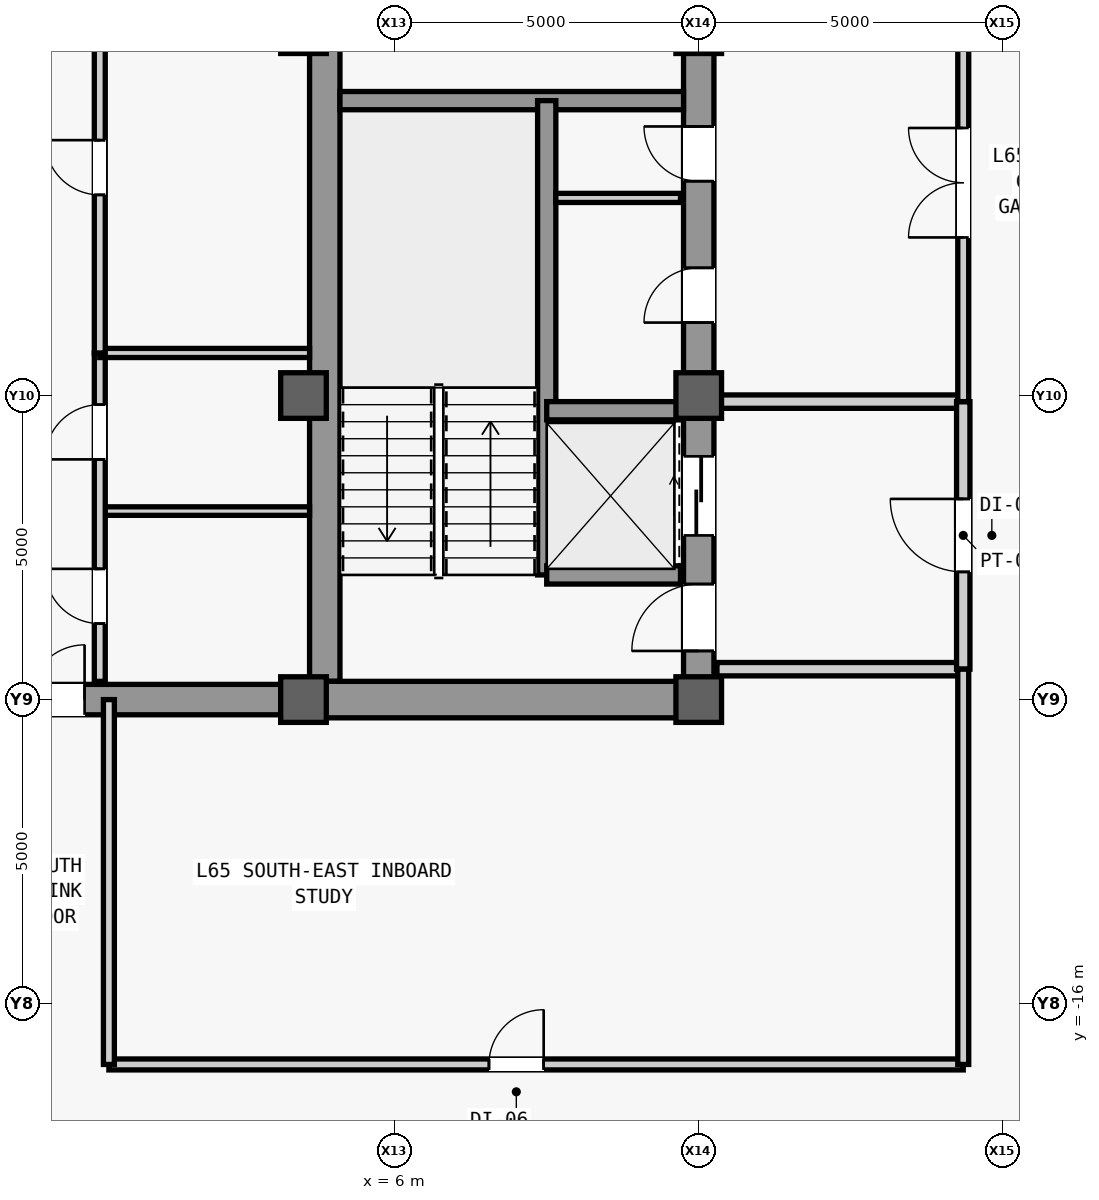
"""IFC4 building model, lengths in metres.
Left out: names, types, materials, properties, quantities, classifications, styles, units other than length and angle.
Written with IfcOpenShell. Run it as: python <this file> out.ifc"""

import sys

from ifc_helpers import new_model, si_unit, direction, frame, frame_2d, origin, origin_2d, place, context, subcontext, project, spatial, rectangle, extrude, source, transform, mapped, element, fill, save


model = new_model("IFC4")
c1 = context("Model", 3, precision=1e-05, world=origin(), true_north=direction((0.0, 1.0)))
c2 = subcontext(c1, "Body", "Model", "MODEL_VIEW")
j1 = project(units=[si_unit("LENGTHUNIT", "METRE"), si_unit("PLANEANGLEUNIT", "RADIAN")], contexts=[c1])
p1 = place(None, origin())
s1 = spatial("IfcSite", under=j1, at=p1, CompositionType="ELEMENT")
p2 = place(p1, origin())
s2 = spatial("IfcBuilding", under=s1, at=p2, CompositionType="ELEMENT")
p3 = place(p2, frame((0.0, 0.0, 277.5)))
s3 = spatial("IfcBuildingStorey", under=s2, at=p3, CompositionType="ELEMENT", Elevation=277.5)
m1 = source(origin(), c2, "Body", "SweptSolid", [
    extrude(rectangle(XDim=22.0, YDim=0.5, at=frame_2d((11.0, 0.0))), origin(), (0.0, 0.0, 1.0), 3.78),
])
p4 = place(p3, frame((11.0, -11.0, 0.0), z_axis=(0.0, 0.0, 1.0), x_axis=(0.0, 1.0, 0.0)))
e1 = element("IfcWall", 1, at=p4, inside=s3, PredefinedType="SHEAR", context=c2, shape_type="MappedRepresentation", body=[
    mapped(m1, transform((0.0, 0.0, 0.0), scale=1.0)),
])
m2 = source(origin(), c2, "Body", "SweptSolid", [
    extrude(rectangle(XDim=1.1, YDim=2.2, at=frame_2d((0.55, 1.1))), frame((0.0, 0.26, 0.0), z_axis=(0.0, -1.0, 0.0), x_axis=(1.0, 0.0, 0.0)), (0.0, 0.0, 1.0), 0.52),
])
p5 = place(p4, frame((0.8, 0.0, 0.0)))
e2 = element("IfcOpeningElement", 2, at=p5, cuts=e1, PredefinedType="OPENING", context=c2, shape_type="MappedRepresentation", body=[
    mapped(m2, transform((0.0, 0.0, 0.0), scale=1.0)),
])
m3 = source(origin(), c2, "Body", "SweptSolid", [
    extrude(rectangle(XDim=0.9, YDim=2.15, at=frame_2d((0.45, 1.075))), frame((0.0, 0.26, 0.0), z_axis=(0.0, -1.0, 0.0), x_axis=(1.0, 0.0, 0.0)), (0.0, 0.0, 1.0), 0.52),
])
p6 = place(p4, frame((6.2, 0.0, 0.0)))
e3 = element("IfcOpeningElement", 3, at=p6, cuts=e1, PredefinedType="OPENING", context=c2, shape_type="MappedRepresentation", body=[
    mapped(m3, transform((0.0, 0.0, 0.0), scale=1.0)),
])
p7 = place(p4, frame((8.525, 0.0, 0.0)))
e4 = element("IfcOpeningElement", 4, at=p7, cuts=e1, PredefinedType="OPENING", context=c2, shape_type="MappedRepresentation", body=[
    mapped(m3, transform((0.0, 0.0, 0.0), scale=1.0)),
])
m4 = source(origin(), c2, "Body", "SweptSolid", [
    extrude(rectangle(XDim=1.2, YDim=2.3, at=frame_2d((0.6, 1.15))), frame((0.0, 0.26, 0.0), z_axis=(0.0, -1.0, 0.0), x_axis=(1.0, 0.0, 0.0)), (0.0, 0.0, 1.0), 0.52),
])
p8 = place(p4, frame((17.6, 0.0, 0.0)))
e5 = element("IfcOpeningElement", 5, at=p8, cuts=e1, PredefinedType="OPENING", context=c2, shape_type="MappedRepresentation", body=[
    mapped(m4, transform((0.0, 0.0, 0.0), scale=1.0)),
])
p9 = place(p4, frame((19.6, 0.0, 0.0)))
e6 = element("IfcOpeningElement", 6, at=p9, cuts=e1, PredefinedType="OPENING", context=c2, shape_type="MappedRepresentation", body=[
    mapped(m4, transform((0.0, 0.0, 0.0), scale=1.0)),
])
m5 = source(origin(), c2, "Body", "SweptSolid", [
    extrude(rectangle(XDim=1.3, YDim=2.3, at=frame_2d((0.65, 1.15))), frame((0.0, 0.26, 0.0), z_axis=(0.0, -1.0, 0.0), x_axis=(1.0, 0.0, 0.0)), (0.0, 0.0, 1.0), 0.52),
])
p10 = place(p4, frame((2.7, 0.0, 0.0)))
e7 = element("IfcOpeningElement", 7, at=p10, cuts=e1, PredefinedType="OPENING", context=c2, shape_type="MappedRepresentation", body=[
    mapped(m5, transform((0.0, 0.0, 0.0), scale=1.0)),
])
p11 = place(p4, frame((13.35, 0.0, 0.0)))
e8 = element("IfcOpeningElement", 8, at=p11, cuts=e1, PredefinedType="OPENING", context=c2, shape_type="MappedRepresentation", body=[
    mapped(m5, transform((0.0, 0.0, 0.0), scale=1.0)),
])
m6 = source(origin(), c2, "Body", "SweptSolid", [
    extrude(rectangle(XDim=21.4, YDim=0.5, at=frame_2d((10.7, 0.0))), origin(), (0.0, 0.0, 1.0), 3.78),
])
p12 = place(p3, frame((4.85, -10.7, 0.0), z_axis=(0.0, 0.0, 1.0), x_axis=(0.0, 1.0, 0.0)))
e9 = element("IfcWall", 9, at=p12, inside=s3, PredefinedType="SHEAR", context=c2, shape_type="MappedRepresentation", body=[
    mapped(m6, transform((0.0, 0.0, 0.0), scale=1.0)),
])
m7 = source(origin(), c2, "Body", "SweptSolid", [
    extrude(rectangle(XDim=5.9, YDim=0.6, at=frame_2d((2.95, 0.0))), origin(), (0.0, 0.0, 1.0), 3.78),
])
p13 = place(p3, frame((4.85, -11.0, 0.0), z_axis=(0.0, 0.0, 1.0), x_axis=(1.0, 0.0, 0.0)))
e10 = element("IfcWall", 10, at=p13, inside=s3, PredefinedType="SHEAR", context=c2, shape_type="MappedRepresentation", body=[
    mapped(m7, transform((0.0, 0.0, 0.0), scale=1.0)),
])
m8 = source(origin(), c2, "Body", "SweptSolid", [
    extrude(rectangle(XDim=5.65, YDim=0.3, at=frame_2d((2.825, 0.0))), origin(), (0.0, 0.0, 1.0), 3.78),
])
p14 = place(p3, frame((5.1, -1.15, 0.0), z_axis=(0.0, 0.0, 1.0), x_axis=(1.0, 0.0, 0.0)))
e11 = element("IfcWall", 11, at=p14, inside=s3, PredefinedType="SHEAR", context=c2, shape_type="MappedRepresentation", body=[
    mapped(m8, transform((0.0, 0.0, 0.0), scale=1.0)),
])
m9 = source(origin(), c2, "Body", "SweptSolid", [
    extrude(rectangle(XDim=9.2, YDim=0.5, at=frame_2d((4.6, 0.0))), origin(), (0.0, 0.0, 1.0), 3.78),
])
p15 = place(p3, frame((-4.6, -11.0, 0.0), z_axis=(0.0, 0.0, 1.0), x_axis=(1.0, 0.0, 0.0)))
e12 = element("IfcWall", 12, at=p15, inside=s3, PredefinedType="SHEAR", context=c2, shape_type="MappedRepresentation", body=[
    mapped(m9, transform((0.0, 0.0, 0.0), scale=1.0)),
])
m10 = source(origin(), c2, "Body", "SweptSolid", [
    extrude(rectangle(XDim=1.8, YDim=2.25, at=frame_2d((0.9, 1.125))), frame((0.0, 0.26, 0.0), z_axis=(0.0, -1.0, 0.0), x_axis=(1.0, 0.0, 0.0)), (0.0, 0.0, 1.0), 0.52),
])
p16 = place(p15, frame((3.7, 0.0, 0.0)))
e13 = element("IfcOpeningElement", 13, at=p16, cuts=e12, PredefinedType="OPENING", context=c2, shape_type="MappedRepresentation", body=[
    mapped(m10, transform((0.0, 0.0, 0.0), scale=1.0)),
])
m11 = source(origin(), c2, "Body", "SweptSolid", [
    extrude(rectangle(XDim=0.75, YDim=0.75, at=origin_2d()), origin(), (0.0, 0.0, 1.0), 4.0),
])
for number, where, z_axis, x_axis in (
    (14, (4.5, -11.0, 0.0), (0.0, 0.0, 1.0), (1.0, 0.0, 0.0)),
    (15, (4.5, -6.0, 0.0), (0.0, 0.0, 1.0), (1.0, 0.0, 0.0)),
    (16, (4.5, 0.0, 0.0), (0.0, 0.0, 1.0), (1.0, 0.0, 0.0)),
    (17, (11.0, -11.0, 0.0), (0.0, 0.0, 1.0), (1.0, 0.0, 0.0)),
    (18, (11.0, -6.0, 0.0), (0.0, 0.0, 1.0), (1.0, 0.0, 0.0)),
    (19, (11.0, 0.0, 0.0), (0.0, 0.0, 1.0), (1.0, 0.0, 0.0)),
):
    element("IfcColumn", number, at=place(p3, frame(where, z_axis=z_axis, x_axis=x_axis)), inside=s3, PredefinedType="COLUMN", context=c2, shape_type="MappedRepresentation", body=[
        mapped(m11, transform((0.0, 0.0, 0.0), scale=1.0)),
    ])
m12 = source(origin(), c2, "Body", "SweptSolid", [
    extrude(rectangle(XDim=7.8, YDim=0.3, at=frame_2d((3.9, 0.0))), origin(), (0.0, 0.0, 1.0), 3.78),
])
p17 = place(p3, frame((8.5, -8.95, 0.0), z_axis=(0.0, 0.0, 1.0), x_axis=(0.0, 1.0, 0.0)))
e20 = element("IfcWall", 20, at=p17, inside=s3, PredefinedType="SHEAR", context=c2, shape_type="MappedRepresentation", body=[
    mapped(m12, transform((0.0, 0.0, 0.0), scale=1.0)),
])
m13 = source(origin(), c2, "Body", "SweptSolid", [
    extrude(rectangle(XDim=2.2, YDim=0.3, at=frame_2d((1.1, 0.0))), origin(), (0.0, 0.0, 1.0), 3.78),
])
for number, where, z_axis, x_axis in (
    (21, (8.5, -8.95, 0.0), (0.0, 0.0, 1.0), (1.0, 0.0, 0.0)),
    (22, (8.5, -6.25, 0.0), (0.0, 0.0, 1.0), (1.0, 0.0, 0.0)),
):
    element("IfcWall", number, at=place(p3, frame(where, z_axis=z_axis, x_axis=x_axis)), inside=s3, PredefinedType="SHEAR", context=c2, shape_type="MappedRepresentation", body=[
        mapped(m13, transform((0.0, 0.0, 0.0), scale=1.0)),
    ])
m14 = source(origin(), c2, "Body", "SweptSolid", [
    extrude(rectangle(XDim=2.05, YDim=0.15, at=frame_2d((1.025, 0.0))), origin(), (0.0, 0.0, 1.0), 3.78),
])
p18 = place(p3, frame((8.65, -2.75, 0.0), z_axis=(0.0, 0.0, 1.0), x_axis=(1.0, 0.0, 0.0)))
e23 = element("IfcWall", 23, at=p18, inside=s3, PredefinedType="PARTITIONING", context=c2, shape_type="MappedRepresentation", body=[
    mapped(m14, transform((0.0, 0.0, 0.0), scale=1.0)),
])
m15 = source(origin(), c2, "Body", "SweptSolid", [
    extrude(rectangle(XDim=4.05, YDim=0.22, at=frame_2d((2.025, 0.0))), origin(), (0.0, 0.0, 1.0), 3.78),
])
p19 = place(p3, frame((11.3, -10.5, 0.0), z_axis=(0.0, 0.0, 1.0), x_axis=(1.0, 0.0, 0.0)))
e24 = element("IfcWall", 24, at=p19, inside=s3, PredefinedType="PARTITIONING", context=c2, shape_type="MappedRepresentation", body=[
    mapped(m15, transform((0.0, 0.0, 0.0), scale=1.0)),
])
m16 = source(origin(), c2, "Body", "SweptSolid", [
    extrude(rectangle(XDim=4.05, YDim=0.22, at=frame_2d((2.025, 0.0))), origin(), (0.0, 0.0, 1.0), 3.085),
])
p20 = place(p3, frame((11.3, -6.1, 0.0), z_axis=(0.0, 0.0, 1.0), x_axis=(1.0, 0.0, 0.0)))
e25 = element("IfcWall", 25, at=p20, inside=s3, PredefinedType="PARTITIONING", context=c2, shape_type="MappedRepresentation", body=[
    mapped(m16, transform((0.0, 0.0, 0.0), scale=1.0)),
])
m17 = source(origin(), c2, "Body", "SweptSolid", [
    extrude(rectangle(XDim=4.4, YDim=0.22, at=frame_2d((2.2, 0.0))), origin(), (0.0, 0.0, 1.0), 3.78),
])
p21 = place(p3, frame((15.35, -10.5, 0.0), z_axis=(0.0, 0.0, 1.0), x_axis=(0.0, 1.0, 0.0)))
e26 = element("IfcWall", 26, at=p21, inside=s3, PredefinedType="PARTITIONING", context=c2, shape_type="MappedRepresentation", body=[
    mapped(m17, transform((0.0, 0.0, 0.0), scale=1.0)),
])
m18 = source(origin(), c2, "Body", "SweptSolid", [
    extrude(rectangle(XDim=1.2, YDim=2.2, at=frame_2d((0.6, 1.1))), frame((0.0, 0.12, 0.0), z_axis=(0.0, -1.0, 0.0), x_axis=(1.0, 0.0, 0.0)), (0.0, 0.0, 1.0), 0.24),
])
p22 = place(p21, frame((1.6, 0.0, 0.0)))
e27 = element("IfcOpeningElement", 27, at=p22, cuts=e26, PredefinedType="OPENING", context=c2, shape_type="MappedRepresentation", body=[
    mapped(m18, transform((0.0, 0.0, 0.0), scale=1.0)),
])
m19 = source(origin(), c2, "Body", "SweptSolid", [
    extrude(rectangle(XDim=16.6, YDim=0.18, at=frame_2d((8.3, 0.0))), origin(), (0.0, 0.0, 1.0), 3.78),
])
p23 = place(p3, frame((15.35, -6.1, 0.0), z_axis=(0.0, 0.0, 1.0), x_axis=(0.0, 1.0, 0.0)))
e28 = element("IfcWall", 28, at=p23, inside=s3, PredefinedType="PARTITIONING", context=c2, shape_type="MappedRepresentation", body=[
    mapped(m19, transform((0.0, 0.0, 0.0), scale=1.0)),
])
m20 = source(origin(), c2, "Body", "SweptSolid", [
    extrude(rectangle(XDim=1.8, YDim=2.25, at=frame_2d((0.9, 1.125))), frame((0.0, 0.1, 0.0), z_axis=(0.0, -1.0, 0.0), x_axis=(1.0, 0.0, 0.0)), (0.0, 0.0, 1.0), 0.2),
])
p24 = place(p23, frame((2.7, 0.0, 0.0)))
e29 = element("IfcOpeningElement", 29, at=p24, cuts=e28, PredefinedType="OPENING", context=c2, shape_type="MappedRepresentation", body=[
    mapped(m20, transform((0.0, 0.0, 0.0), scale=1.0)),
])
p25 = place(p23, frame((13.0, 0.0, 0.0)))
e30 = element("IfcOpeningElement", 30, at=p25, cuts=e28, PredefinedType="OPENING", context=c2, shape_type="MappedRepresentation", body=[
    mapped(m20, transform((0.0, 0.0, 0.0), scale=1.0)),
])
m21 = source(origin(), c2, "Body", "SweptSolid", [
    extrude(rectangle(XDim=3.45, YDim=0.14, at=frame_2d((1.725, 0.0))), origin(), (0.0, 0.0, 1.0), 3.78),
])
p26 = place(p3, frame((1.15, -7.9, 0.0), z_axis=(0.0, 0.0, 1.0), x_axis=(1.0, 0.0, 0.0)))
e31 = element("IfcWall", 31, at=p26, inside=s3, PredefinedType="PARTITIONING", context=c2, shape_type="MappedRepresentation", body=[
    mapped(m21, transform((0.0, 0.0, 0.0), scale=1.0)),
])
m22 = source(origin(), c2, "Body", "SweptSolid", [
    extrude(rectangle(XDim=5.4, YDim=0.18, at=frame_2d((2.7, 0.0))), origin(), (0.0, 0.0, 1.0), 3.78),
])
p27 = place(p3, frame((1.15, -10.7, 0.0), z_axis=(0.0, 0.0, 1.0), x_axis=(0.0, 1.0, 0.0)))
e32 = element("IfcWall", 32, at=p27, inside=s3, PredefinedType="PARTITIONING", context=c2, shape_type="MappedRepresentation", body=[
    mapped(m22, transform((0.0, 0.0, 0.0), scale=1.0)),
])
m23 = source(origin(), c2, "Body", "SweptSolid", [
    extrude(rectangle(XDim=0.9, YDim=2.15, at=frame_2d((0.45, 1.075))), frame((0.0, 0.1, 0.0), z_axis=(0.0, -1.0, 0.0), x_axis=(1.0, 0.0, 0.0)), (0.0, 0.0, 1.0), 0.2),
])
p28 = place(p27, frame((0.95, 0.0, 0.0)))
e33 = element("IfcOpeningElement", 33, at=p28, cuts=e32, PredefinedType="OPENING", context=c2, shape_type="MappedRepresentation", body=[
    mapped(m23, transform((0.0, 0.0, 0.0), scale=1.0)),
])
p29 = place(p27, frame((3.65, 0.0, 0.0)))
e34 = element("IfcOpeningElement", 34, at=p29, cuts=e32, PredefinedType="OPENING", context=c2, shape_type="MappedRepresentation", body=[
    mapped(m23, transform((0.0, 0.0, 0.0), scale=1.0)),
])
m24 = source(origin(), c2, "Body", "SweptSolid", [
    extrude(rectangle(XDim=3.45, YDim=0.15, at=frame_2d((1.725, 0.0))), origin(), (0.0, 0.0, 1.0), 3.78),
])
p30 = place(p3, frame((1.15, -5.3, 0.0), z_axis=(0.0, 0.0, 1.0), x_axis=(1.0, 0.0, 0.0)))
e35 = element("IfcWall", 35, at=p30, inside=s3, PredefinedType="PARTITIONING", context=c2, shape_type="MappedRepresentation", body=[
    mapped(m24, transform((0.0, 0.0, 0.0), scale=1.0)),
])
m25 = source(origin(), c2, "Body", "SweptSolid", [
    extrude(rectangle(XDim=10.6, YDim=0.18, at=frame_2d((5.3, 0.0))), origin(), (0.0, 0.0, 1.0), 3.78),
])
p31 = place(p3, frame((1.15, -5.3, 0.0), z_axis=(0.0, 0.0, 1.0), x_axis=(0.0, 1.0, 0.0)))
e36 = element("IfcWall", 36, at=p31, inside=s3, PredefinedType="PARTITIONING", context=c2, shape_type="MappedRepresentation", body=[
    mapped(m25, transform((0.0, 0.0, 0.0), scale=1.0)),
])
p32 = place(p31, frame((2.6, 0.0, 0.0)))
e37 = element("IfcOpeningElement", 37, at=p32, cuts=e36, PredefinedType="OPENING", context=c2, shape_type="MappedRepresentation", body=[
    mapped(m23, transform((0.0, 0.0, 0.0), scale=1.0)),
])
p33 = place(p31, frame((7.25, 0.0, 0.0)))
e38 = element("IfcOpeningElement", 38, at=p33, cuts=e36, PredefinedType="OPENING", context=c2, shape_type="MappedRepresentation", body=[
    mapped(m23, transform((0.0, 0.0, 0.0), scale=1.0)),
])
p34 = place(p31, frame((9.475, 0.0, 0.0)))
e39 = element("IfcOpeningElement", 39, at=p34, cuts=e36, PredefinedType="OPENING", context=c2, shape_type="MappedRepresentation", body=[
    mapped(m23, transform((0.0, 0.0, 0.0), scale=1.0)),
])
m26 = source(origin(), c2, "Body", "SweptSolid", [
    extrude(rectangle(XDim=14.05, YDim=0.18, at=frame_2d((7.025, 0.0))), origin(), (0.0, 0.0, 1.0), 3.78),
])
p35 = place(p3, frame((1.3, -17.0, 0.0), z_axis=(0.0, 0.0, 1.0), x_axis=(1.0, 0.0, 0.0)))
e40 = element("IfcWall", 40, at=p35, inside=s3, PredefinedType="PARTITIONING", context=c2, shape_type="MappedRepresentation", body=[
    mapped(m26, transform((0.0, 0.0, 0.0), scale=1.0)),
])
p36 = place(p35, frame((6.25, 0.0, 0.0)))
e41 = element("IfcOpeningElement", 41, at=p36, cuts=e40, PredefinedType="OPENING", context=c2, shape_type="MappedRepresentation", body=[
    mapped(m23, transform((0.0, 0.0, 0.0), scale=1.0)),
])
m27 = source(origin(), c2, "Body", "SweptSolid", [
    extrude(rectangle(XDim=6.0, YDim=0.18, at=frame_2d((3.0, 0.0))), origin(), (0.0, 0.0, 1.0), 3.78),
])
p37 = place(p3, frame((1.3, -17.0, 0.0), z_axis=(0.0, 0.0, 1.0), x_axis=(0.0, 1.0, 0.0)))
e42 = element("IfcWall", 42, at=p37, inside=s3, PredefinedType="PARTITIONING", context=c2, shape_type="MappedRepresentation", body=[
    mapped(m27, transform((0.0, 0.0, 0.0), scale=1.0)),
])
m28 = source(origin(), c2, "Body", "SweptSolid", [
    extrude(rectangle(XDim=6.5, YDim=0.18, at=frame_2d((3.25, 0.0))), origin(), (0.0, 0.0, 1.0), 3.78),
])
p38 = place(p3, frame((15.35, -17.0, 0.0), z_axis=(0.0, 0.0, 1.0), x_axis=(0.0, 1.0, 0.0)))
e43 = element("IfcWall", 43, at=p38, inside=s3, PredefinedType="PARTITIONING", context=c2, shape_type="MappedRepresentation", body=[
    mapped(m28, transform((0.0, 0.0, 0.0), scale=1.0)),
])
m29 = source(origin(), c2, "Body", "SweptSolid", [
    extrude(rectangle(XDim=1.1, YDim=2.2, at=frame_2d((0.55, 1.1))), frame((0.0, 0.025, 0.0), z_axis=(0.0, -1.0, 0.0), x_axis=(1.0, 0.0, 0.0)), (0.0, 0.0, 1.0), 0.05),
])
p39 = place(p5, origin())
e44 = element("IfcDoor", 44, at=p39, inside=s3, OperationType="SINGLE_SWING_LEFT", PredefinedType="DOOR", context=c2, shape_type="MappedRepresentation", body=[
    mapped(m29, transform((0.0, 0.0, 0.0), scale=1.0)),
])
fill(e2, e44)
m30 = source(origin(), c2, "Body", "SweptSolid", [
    extrude(rectangle(XDim=0.9, YDim=2.15, at=frame_2d((0.45, 1.075))), frame((0.0, 0.025, 0.0), z_axis=(0.0, -1.0, 0.0), x_axis=(1.0, 0.0, 0.0)), (0.0, 0.0, 1.0), 0.05),
])
p40 = place(p6, origin())
e45 = element("IfcDoor", 45, at=p40, inside=s3, OperationType="SINGLE_SWING_LEFT", PredefinedType="DOOR", context=c2, shape_type="MappedRepresentation", body=[
    mapped(m30, transform((0.0, 0.0, 0.0), scale=1.0)),
])
fill(e3, e45)
p41 = place(p7, origin())
e46 = element("IfcDoor", 46, at=p41, inside=s3, OperationType="SINGLE_SWING_RIGHT", PredefinedType="DOOR", context=c2, shape_type="MappedRepresentation", body=[
    mapped(m30, transform((0.0, 0.0, 0.0), scale=1.0)),
])
fill(e4, e46)
m31 = source(origin(), c2, "Body", "SweptSolid", [
    extrude(rectangle(XDim=1.2, YDim=2.2, at=frame_2d((0.6, 1.1))), frame((0.0, 0.025, 0.0), z_axis=(0.0, -1.0, 0.0), x_axis=(1.0, 0.0, 0.0)), (0.0, 0.0, 1.0), 0.05),
])
p42 = place(p22, origin())
e47 = element("IfcDoor", 47, at=p42, inside=s3, OperationType="SINGLE_SWING_RIGHT", PredefinedType="DOOR", context=c2, shape_type="MappedRepresentation", body=[
    mapped(m31, transform((0.0, 0.0, 0.0), scale=1.0)),
])
fill(e27, e47)
m32 = source(origin(), c2, "Body", "SweptSolid", [
    extrude(rectangle(XDim=1.8, YDim=2.25, at=frame_2d((0.9, 1.125))), frame((0.0, 0.025, 0.0), z_axis=(0.0, -1.0, 0.0), x_axis=(1.0, 0.0, 0.0)), (0.0, 0.0, 1.0), 0.05),
])
p43 = place(p24, origin())
e48 = element("IfcDoor", 48, at=p43, inside=s3, OperationType="SINGLE_SWING_RIGHT", PredefinedType="DOOR", context=c2, shape_type="MappedRepresentation", body=[
    mapped(m32, transform((0.0, 0.0, 0.0), scale=1.0)),
])
fill(e29, e48)
p44 = place(p28, origin())
e49 = element("IfcDoor", 49, at=p44, inside=s3, OperationType="SINGLE_SWING_RIGHT", PredefinedType="DOOR", context=c2, shape_type="MappedRepresentation", body=[
    mapped(m30, transform((0.0, 0.0, 0.0), scale=1.0)),
])
fill(e33, e49)
p45 = place(p29, origin())
e50 = element("IfcDoor", 50, at=p45, inside=s3, OperationType="SINGLE_SWING_LEFT", PredefinedType="DOOR", context=c2, shape_type="MappedRepresentation", body=[
    mapped(m30, transform((0.0, 0.0, 0.0), scale=1.0)),
])
fill(e34, e50)
p46 = place(p16, origin())
e51 = element("IfcDoor", 51, at=p46, inside=s3, OperationType="SINGLE_SWING_LEFT", PredefinedType="DOOR", context=c2, shape_type="MappedRepresentation", body=[
    mapped(m32, transform((0.0, 0.0, 0.0), scale=1.0)),
])
fill(e13, e51)
p47 = place(p32, origin())
e52 = element("IfcDoor", 52, at=p47, inside=s3, OperationType="SINGLE_SWING_RIGHT", PredefinedType="DOOR", context=c2, shape_type="MappedRepresentation", body=[
    mapped(m30, transform((0.0, 0.0, 0.0), scale=1.0)),
])
fill(e37, e52)
p48 = place(p36, origin())
e53 = element("IfcDoor", 53, at=p48, inside=s3, OperationType="SINGLE_SWING_RIGHT", PredefinedType="DOOR", context=c2, shape_type="MappedRepresentation", body=[
    mapped(m30, transform((0.0, 0.0, 0.0), scale=1.0)),
])
fill(e41, e53)
m33 = source(origin(), c2, "Body", "SweptSolid", [
    extrude(rectangle(XDim=1.3, YDim=2.3, at=frame_2d((0.65, 1.15))), frame((0.0, 0.025, 0.0), z_axis=(0.0, -1.0, 0.0), x_axis=(1.0, 0.0, 0.0)), (0.0, 0.0, 1.0), 0.05),
])
p49 = place(p10, origin())
e54 = element("IfcDoor", 54, at=p49, inside=s3, OperationType="SLIDING_TO_LEFT", PredefinedType="DOOR", context=c2, shape_type="MappedRepresentation", body=[
    mapped(m33, transform((0.0, 0.0, 0.0), scale=1.0)),
])
fill(e7, e54)
save(model, sys.argv[1])
